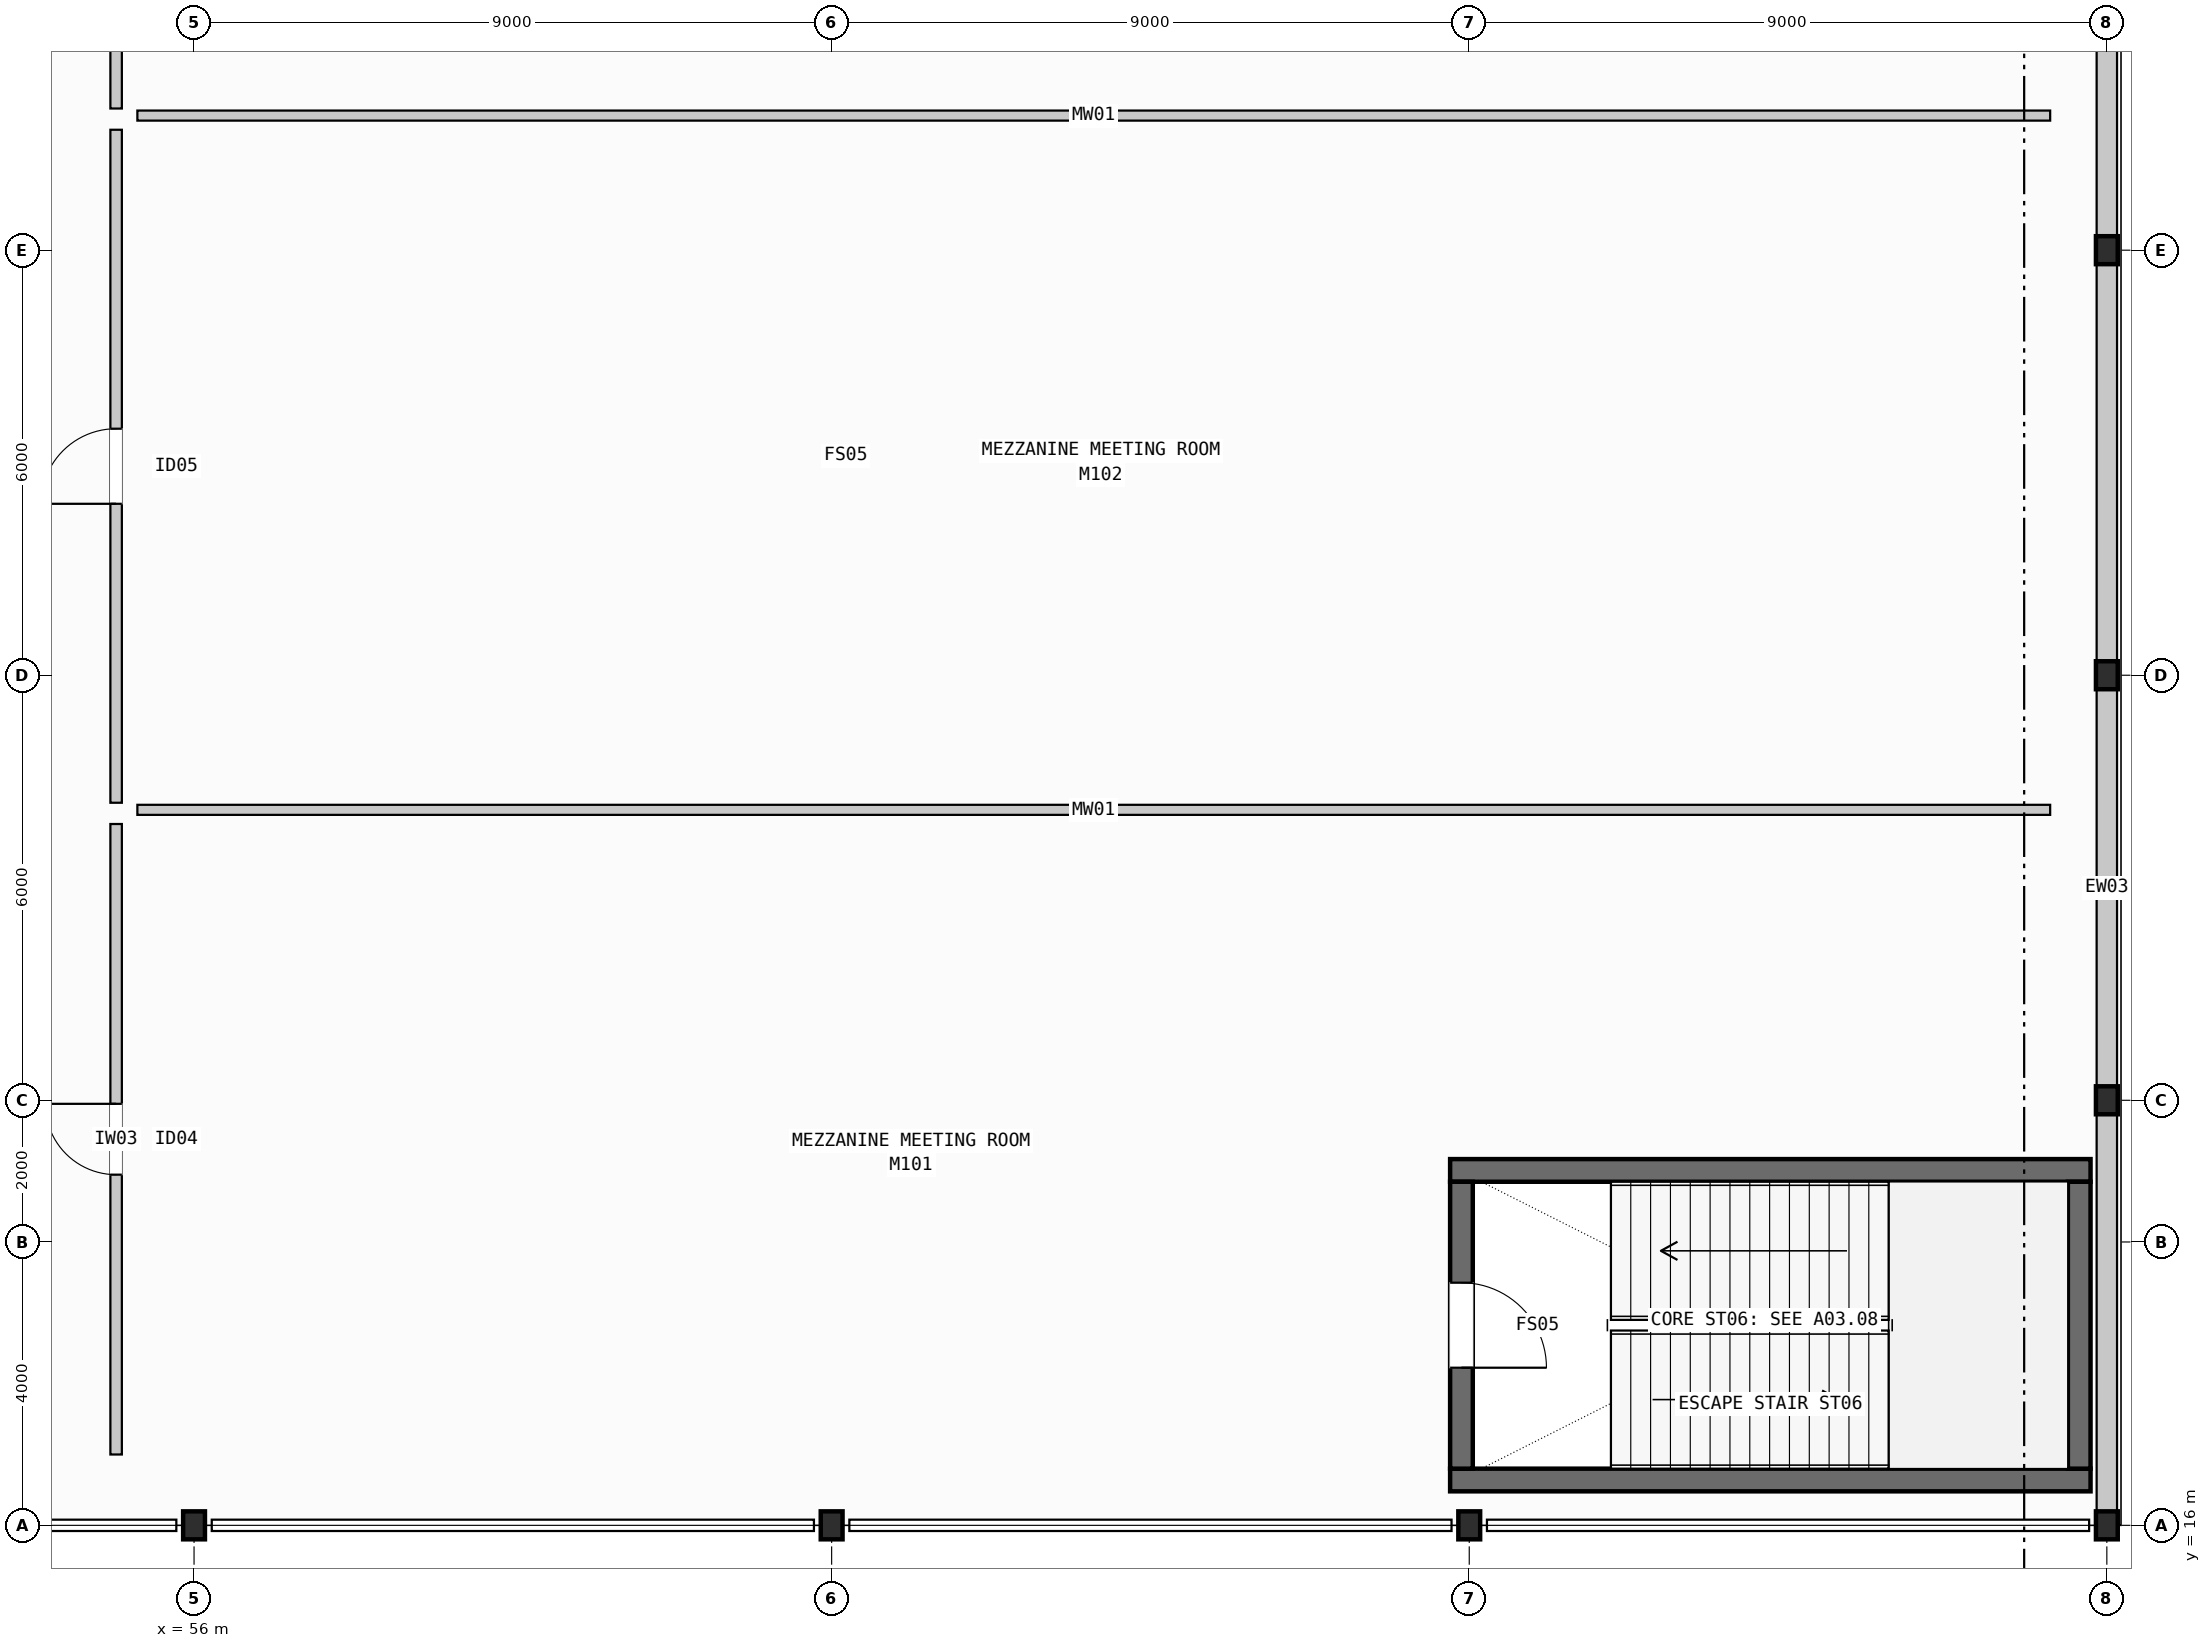
"""IFC4 building model, lengths in metres.
Left out: names, types, materials, properties, quantities, classifications, styles, units other than length and angle.
Written with IfcOpenShell. Run it as: python <this file> out.ifc"""

import sys

from ifc_helpers import new_model, si_unit, direction, frame, frame_2d, origin, origin_2d, place, context, subcontext, project, spatial, rectangle, i_section, extrude, element, fill, save


model = new_model("IFC4")
c1 = context("Model", 3, precision=1e-05, world=origin(), true_north=direction((0.0, 1.0)))
c2 = subcontext(c1, "Body", "Model", "MODEL_VIEW")
j1 = project(units=[si_unit("LENGTHUNIT", "METRE"), si_unit("PLANEANGLEUNIT", "RADIAN")], contexts=[c1])
p1 = place(None, origin())
s1 = spatial("IfcSite", under=j1, at=p1, CompositionType="ELEMENT")
p2 = place(p1, origin())
s2 = spatial("IfcBuilding", under=s1, at=p2, CompositionType="ELEMENT")
p3 = place(p2, frame((0.0, 0.0, 6.0)))
s3 = spatial("IfcBuildingStorey", under=s2, at=p3, CompositionType="ELEMENT", Elevation=6.0)
for number, where, z_axis, x_axis in (
    (1, (56.0, 16.0, 0.0), (0.0, 0.0, 1.0), (1.0, 0.0, 0.0)),
    (2, (65.0, 16.0, 0.0), (0.0, 0.0, 1.0), (1.0, 0.0, 0.0)),
    (3, (74.0, 16.0, 0.0), (0.0, 0.0, 1.0), (1.0, 0.0, 0.0)),
    (4, (83.0, 16.0, 0.0), (0.0, 0.0, 1.0), (1.0, 0.0, 0.0)),
    (5, (83.0, 22.0, 0.0), (0.0, 0.0, 1.0), (1.0, 0.0, 0.0)),
    (6, (83.0, 28.0, 0.0), (0.0, 0.0, 1.0), (1.0, 0.0, 0.0)),
    (7, (83.0, 34.0, 0.0), (0.0, 0.0, 1.0), (1.0, 0.0, 0.0)),
):
    element("IfcColumn", number, at=place(p3, frame(where, z_axis=z_axis, x_axis=x_axis)), inside=s3, PredefinedType="COLUMN", context=c2, shape_type="SweptSolid", body=[
        extrude(i_section(OverallWidth=0.308, OverallDepth=0.395, WebThickness=0.021, FlangeThickness=0.04, FilletRadius=0.027, at=origin_2d()), origin(), (0.0, 0.0, 1.0), 5.4),
    ])
for number, where, z_axis, x_axis in (
    (8, (73.73, 16.64, 0.0), (0.0, 0.0, 1.0), (1.0, 0.0, 0.0)),
    (9, (73.73, 21.01, 0.0), (0.0, 0.0, 1.0), (1.0, 0.0, 0.0)),
):
    element("IfcWall", number, at=place(p3, frame(where, z_axis=z_axis, x_axis=x_axis)), inside=s3, PredefinedType="SHEAR", context=c2, shape_type="SweptSolid", body=[
        extrude(rectangle(XDim=9.04, YDim=0.32, at=frame_2d((4.52, 0.0))), origin(), (0.0, 0.0, 1.0), 5.4),
    ])
p4 = place(p3, frame((73.89, 16.8, 0.0), z_axis=(0.0, 0.0, 1.0), x_axis=(0.0, 1.0, 0.0)))
e10 = element("IfcWall", 10, at=p4, inside=s3, PredefinedType="SHEAR", context=c2, shape_type="SweptSolid", body=[
    extrude(rectangle(XDim=4.05, YDim=0.32, at=frame_2d((2.025, 0.0))), origin(), (0.0, 0.0, 1.0), 5.4),
])
p5 = place(p4, frame((1.425, 0.0, 0.0)))
e11 = element("IfcOpeningElement", 11, at=p5, cuts=e10, PredefinedType="OPENING", context=c2, shape_type="SweptSolid", body=[
    extrude(rectangle(XDim=1.2, YDim=2.2, at=frame_2d((0.6, 1.1))), frame((0.0, 0.17, 0.0), z_axis=(0.0, -1.0, 0.0), x_axis=(1.0, 0.0, 0.0)), (0.0, 0.0, 1.0), 0.34),
])
p6 = place(p3, frame((82.61, 16.8, 0.0), z_axis=(0.0, 0.0, 1.0), x_axis=(0.0, 1.0, 0.0)))
e12 = element("IfcWall", 12, at=p6, inside=s3, PredefinedType="SHEAR", context=c2, shape_type="SweptSolid", body=[
    extrude(rectangle(XDim=4.05, YDim=0.32, at=frame_2d((2.025, 0.0))), origin(), (0.0, 0.0, 1.0), 5.4),
])
for number, where, z_axis, x_axis in (
    (13, (83.0, 16.194, 0.0), (0.0, 0.0, 1.0), (0.0, 1.0, 0.0)),
    (14, (83.0, 22.194, 0.0), (0.0, 0.0, 1.0), (0.0, 1.0, 0.0)),
    (15, (83.0, 28.194, 0.0), (0.0, 0.0, 1.0), (0.0, 1.0, 0.0)),
    (16, (83.0, 34.194, 0.0), (0.0, 0.0, 1.0), (0.0, 1.0, 0.0)),
):
    element("IfcWall", number, at=place(p3, frame(where, z_axis=z_axis, x_axis=x_axis)), inside=s3, PredefinedType="STANDARD", context=c2, shape_type="SweptSolid", body=[
        extrude(rectangle(XDim=5.613, YDim=0.288, at=frame_2d((2.806, 0.0))), origin(), (0.0, 0.0, 1.0), 2.2),
    ])
p7 = place(p3, frame((54.9, 17.0, 0.0), z_axis=(0.0, 0.0, 1.0), x_axis=(0.0, 1.0, 0.0)))
e17 = element("IfcWall", 17, at=p7, inside=s3, PredefinedType="PARTITIONING", context=c2, shape_type="SweptSolid", body=[
    extrude(rectangle(XDim=8.9, YDim=0.162, at=frame_2d((4.45, 0.0))), origin(), (0.0, 0.0, 1.0), 4.4),
])
p8 = place(p7, frame((3.95, 0.0, 0.0)))
e18 = element("IfcOpeningElement", 18, at=p8, cuts=e17, PredefinedType="OPENING", context=c2, shape_type="SweptSolid", body=[
    extrude(rectangle(XDim=1.0, YDim=2.15, at=frame_2d((0.5, 1.075))), frame((0.0, 0.091, 0.0), z_axis=(0.0, -1.0, 0.0), x_axis=(1.0, 0.0, 0.0)), (0.0, 0.0, 1.0), 0.182),
])
p9 = place(p3, frame((54.9, 26.2, 0.0), z_axis=(0.0, 0.0, 1.0), x_axis=(0.0, 1.0, 0.0)))
e19 = element("IfcWall", 19, at=p9, inside=s3, PredefinedType="PARTITIONING", context=c2, shape_type="SweptSolid", body=[
    extrude(rectangle(XDim=9.5, YDim=0.162, at=frame_2d((4.75, 0.0))), origin(), (0.0, 0.0, 1.0), 4.4),
])
p10 = place(p9, frame((4.22, 0.0, 0.0)))
e20 = element("IfcOpeningElement", 20, at=p10, cuts=e19, PredefinedType="OPENING", context=c2, shape_type="SweptSolid", body=[
    extrude(rectangle(XDim=1.06, YDim=2.18, at=frame_2d((0.53, 1.09))), frame((0.0, 0.091, 0.0), z_axis=(0.0, -1.0, 0.0), x_axis=(1.0, 0.0, 0.0)), (0.0, 0.0, 1.0), 0.182),
])
p11 = place(p3, frame((54.9, 36.0, 0.0), z_axis=(0.0, 0.0, 1.0), x_axis=(0.0, 1.0, 0.0)))
e21 = element("IfcWall", 21, at=p11, inside=s3, PredefinedType="PARTITIONING", context=c2, shape_type="SweptSolid", body=[
    extrude(rectangle(XDim=8.8, YDim=0.162, at=frame_2d((4.4, 0.0))), origin(), (0.0, 0.0, 1.0), 4.4),
])
p12 = place(p11, frame((2.59, 0.0, 0.0)))
e22 = element("IfcOpeningElement", 22, at=p12, cuts=e21, PredefinedType="OPENING", context=c2, shape_type="SweptSolid", body=[
    extrude(rectangle(XDim=1.12, YDim=2.22, at=frame_2d((0.56, 1.11))), frame((0.0, 0.091, 0.0), z_axis=(0.0, -1.0, 0.0), x_axis=(1.0, 0.0, 0.0)), (0.0, 0.0, 1.0), 0.182),
])
for number, where, z_axis, x_axis in (
    (23, (55.2, 26.1, 0.0), (0.0, 0.0, 1.0), (1.0, 0.0, 0.0)),
    (24, (55.2, 35.9, 0.0), (0.0, 0.0, 1.0), (1.0, 0.0, 0.0)),
):
    element("IfcWall", number, at=place(p3, frame(where, z_axis=z_axis, x_axis=x_axis)), inside=s3, PredefinedType="MOVABLE", context=c2, shape_type="SweptSolid", body=[
        extrude(rectangle(XDim=27.0, YDim=0.142, at=frame_2d((13.5, 0.0))), origin(), (0.0, 0.0, 1.0), 2.65),
    ])
p13 = place(p5, frame((1.2, 0.0, 0.0), z_axis=(0.0, 0.0, 1.0), x_axis=(-1.0, 0.0, 0.0)))
e25 = element("IfcDoor", 25, at=p13, inside=s3, OperationType="SINGLE_SWING_RIGHT", PredefinedType="DOOR", context=c2, shape_type="SweptSolid", body=[
    extrude(rectangle(XDim=1.2, YDim=2.2, at=frame_2d((0.6, 1.1))), frame((0.0, 0.025, 0.0), z_axis=(0.0, -1.0, 0.0), x_axis=(1.0, 0.0, 0.0)), (0.0, 0.0, 1.0), 0.05),
])
fill(e11, e25)
p14 = place(p8, origin())
e26 = element("IfcDoor", 26, at=p14, inside=s3, OperationType="SINGLE_SWING_RIGHT", PredefinedType="DOOR", context=c2, shape_type="SweptSolid", body=[
    extrude(rectangle(XDim=1.0, YDim=2.15, at=frame_2d((0.5, 1.075))), frame((0.0, 0.025, 0.0), z_axis=(0.0, -1.0, 0.0), x_axis=(1.0, 0.0, 0.0)), (0.0, 0.0, 1.0), 0.05),
])
fill(e18, e26)
p15 = place(p10, origin())
e27 = element("IfcDoor", 27, at=p15, inside=s3, OperationType="SINGLE_SWING_LEFT", PredefinedType="DOOR", context=c2, shape_type="SweptSolid", body=[
    extrude(rectangle(XDim=1.06, YDim=2.18, at=frame_2d((0.53, 1.09))), frame((0.0, 0.025, 0.0), z_axis=(0.0, -1.0, 0.0), x_axis=(1.0, 0.0, 0.0)), (0.0, 0.0, 1.0), 0.05),
])
fill(e20, e27)
save(model, sys.argv[1])
